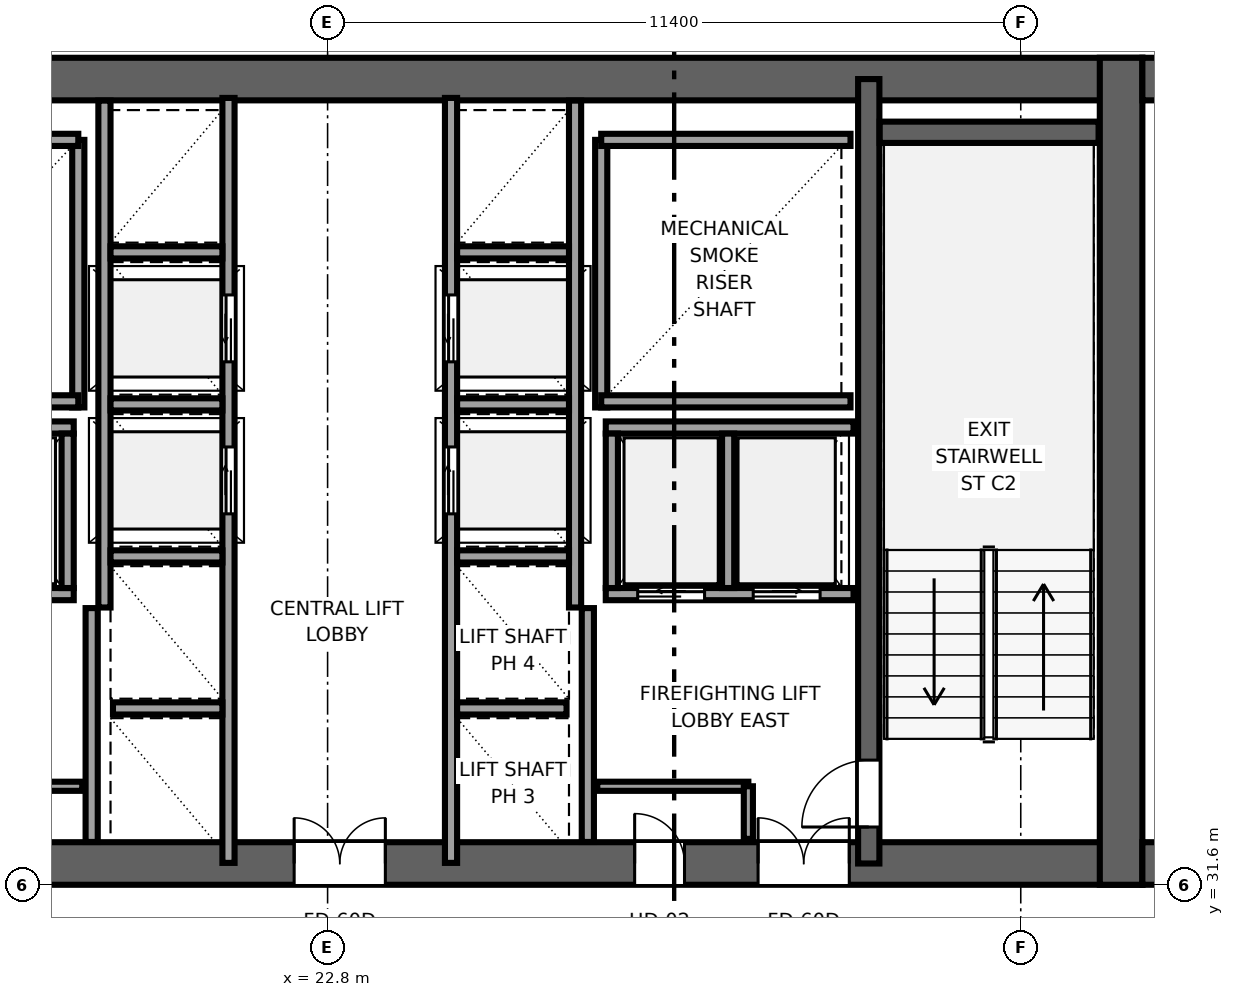
"""IFC4 building model, lengths in metres.
Left out: names, types, materials, properties, quantities, classifications, styles, units other than length and angle.
Written with IfcOpenShell. Run it as: python <this file> out.ifc"""

import sys

from ifc_helpers import new_model, si_unit, direction, frame, frame_2d, origin, place, context, subcontext, project, spatial, rectangle, extrude, source, transform, mapped, element, fill, save


model = new_model("IFC4")
c1 = context("Model", 3, precision=1e-05, world=origin(), true_north=direction((0.0, 1.0)))
c2 = subcontext(c1, "Body", "Model", "MODEL_VIEW")
j1 = project(units=[si_unit("LENGTHUNIT", "METRE"), si_unit("PLANEANGLEUNIT", "RADIAN")], contexts=[c1])
p1 = place(None, origin())
s1 = spatial("IfcSite", under=j1, at=p1, CompositionType="ELEMENT")
p2 = place(p1, origin())
s2 = spatial("IfcBuilding", under=s1, at=p2, CompositionType="ELEMENT")
p3 = place(p2, frame((0.0, 0.0, 191.1)))
s3 = spatial("IfcBuildingStorey", under=s2, at=p3, CompositionType="ELEMENT", Elevation=191.1)
p4 = place(p3, frame((9.8, 31.95, 0.0), z_axis=(0.0, 0.0, 1.0), x_axis=(1.0, 0.0, 0.0)))
e1 = element("IfcWall", 1, at=p4, inside=s3, PredefinedType="SHEAR", context=c2, shape_type="SweptSolid", body=[
    extrude(rectangle(XDim=26.4, YDim=0.7, at=frame_2d((13.2, 0.0))), origin(), (0.0, 0.0, 1.0), 3.55),
])
p5 = place(p4, frame((6.32, 0.0, 0.0), z_axis=(0.0, 0.0, 1.0), x_axis=(-1.0, 0.0, 0.0)))
e2 = element("IfcOpeningElement", 2, at=p5, cuts=e1, PredefinedType="OPENING", context=c2, shape_type="SweptSolid", body=[
    extrude(rectangle(XDim=1.5, YDim=2.04, at=frame_2d((0.75, 1.02))), frame((0.0, 0.36, 0.0), z_axis=(0.0, -1.0, 0.0), x_axis=(1.0, 0.0, 0.0)), (0.0, 0.0, 1.0), 0.72),
])
p6 = place(p4, frame((13.95, 0.0, 0.0), z_axis=(0.0, 0.0, 1.0), x_axis=(-1.0, 0.0, 0.0)))
e3 = element("IfcOpeningElement", 3, at=p6, cuts=e1, PredefinedType="OPENING", context=c2, shape_type="SweptSolid", body=[
    extrude(rectangle(XDim=1.5, YDim=2.04, at=frame_2d((0.75, 1.02))), frame((0.0, 0.36, 0.0), z_axis=(0.0, -1.0, 0.0), x_axis=(1.0, 0.0, 0.0)), (0.0, 0.0, 1.0), 0.72),
])
p7 = place(p4, frame((21.58, 0.0, 0.0), z_axis=(0.0, 0.0, 1.0), x_axis=(-1.0, 0.0, 0.0)))
e4 = element("IfcOpeningElement", 4, at=p7, cuts=e1, PredefinedType="OPENING", context=c2, shape_type="SweptSolid", body=[
    extrude(rectangle(XDim=1.5, YDim=2.04, at=frame_2d((0.75, 1.02))), frame((0.0, 0.36, 0.0), z_axis=(0.0, -1.0, 0.0), x_axis=(1.0, 0.0, 0.0)), (0.0, 0.0, 1.0), 0.72),
])
p8 = place(p4, frame((8.37, 0.0, 0.0), z_axis=(0.0, 0.0, 1.0), x_axis=(-1.0, 0.0, 0.0)))
e5 = element("IfcOpeningElement", 5, at=p8, cuts=e1, PredefinedType="OPENING", context=c2, shape_type="SweptSolid", body=[
    extrude(rectangle(XDim=0.82, YDim=2.01, at=frame_2d((0.41, 1.005))), frame((0.0, 0.36, 0.0), z_axis=(0.0, -1.0, 0.0), x_axis=(1.0, 0.0, 0.0)), (0.0, 0.0, 1.0), 0.72),
])
p9 = place(p4, frame((18.87, 0.0, 0.0), z_axis=(0.0, 0.0, 1.0), x_axis=(-1.0, 0.0, 0.0)))
e6 = element("IfcOpeningElement", 6, at=p9, cuts=e1, PredefinedType="OPENING", context=c2, shape_type="SweptSolid", body=[
    extrude(rectangle(XDim=0.82, YDim=2.01, at=frame_2d((0.41, 1.005))), frame((0.0, 0.36, 0.0), z_axis=(0.0, -1.0, 0.0), x_axis=(1.0, 0.0, 0.0)), (0.0, 0.0, 1.0), 0.72),
])
p10 = place(p3, frame((9.8, 44.85, 0.0), z_axis=(0.0, 0.0, 1.0), x_axis=(1.0, 0.0, 0.0)))
e7 = element("IfcWall", 7, at=p10, inside=s3, PredefinedType="SHEAR", context=c2, shape_type="SweptSolid", body=[
    extrude(rectangle(XDim=26.4, YDim=0.7, at=frame_2d((13.2, 0.0))), origin(), (0.0, 0.0, 1.0), 3.55),
])
p11 = place(p3, frame((35.85, 31.6, 0.0), z_axis=(0.0, 0.0, 1.0), x_axis=(0.0, 1.0, 0.0)))
e8 = element("IfcWall", 8, at=p11, inside=s3, PredefinedType="SHEAR", context=c2, shape_type="SweptSolid", body=[
    extrude(rectangle(XDim=13.6, YDim=0.7, at=frame_2d((6.8, 0.0))), origin(), (0.0, 0.0, 1.0), 3.55),
])
p12 = place(p3, frame((31.7, 31.95, 0.0), z_axis=(0.0, 0.0, 1.0), x_axis=(0.0, 1.0, 0.0)))
e9 = element("IfcWall", 9, at=p12, inside=s3, PredefinedType="SHEAR", context=c2, shape_type="SweptSolid", body=[
    extrude(rectangle(XDim=12.9, YDim=0.35, at=frame_2d((6.45, 0.0))), origin(), (0.0, 0.0, 1.0), 3.55),
])
p13 = place(p12, frame((1.7, 0.0, 0.0), z_axis=(0.0, 0.0, 1.0), x_axis=(-1.0, 0.0, 0.0)))
e10 = element("IfcOpeningElement", 10, at=p13, cuts=e9, PredefinedType="OPENING", context=c2, shape_type="SweptSolid", body=[
    extrude(rectangle(XDim=1.1, YDim=2.12, at=frame_2d((0.55, 1.06))), frame((0.0, 0.185, 0.0), z_axis=(0.0, -1.0, 0.0), x_axis=(1.0, 0.0, 0.0)), (0.0, 0.0, 1.0), 0.37),
])
p14 = place(p3, frame((36.2, 31.95, 0.0), z_axis=(0.0, 0.0, 1.0), x_axis=(1.0, 0.0, 0.0)))
e11 = element("IfcWall", 11, at=p14, inside=s3, PredefinedType="SHEAR", context=c2, shape_type="SweptSolid", body=[
    extrude(rectangle(XDim=4.2, YDim=0.7, at=frame_2d((2.1, 0.0))), origin(), (0.0, 0.0, 1.0), 3.55),
])
p15 = place(p14, frame((1.34, 0.0, 0.0), z_axis=(0.0, 0.0, 1.0), x_axis=(-1.0, 0.0, 0.0)))
e12 = element("IfcOpeningElement", 12, at=p15, cuts=e11, PredefinedType="OPENING", context=c2, shape_type="SweptSolid", body=[
    extrude(rectangle(XDim=1.02, YDim=2.03, at=frame_2d((0.51, 1.015))), frame((0.0, 0.36, 0.0), z_axis=(0.0, -1.0, 0.0), x_axis=(1.0, 0.0, 0.0)), (0.0, 0.0, 1.0), 0.72),
])
p16 = place(p3, frame((36.2, 44.85, 0.0), z_axis=(0.0, 0.0, 1.0), x_axis=(1.0, 0.0, 0.0)))
e13 = element("IfcWall", 13, at=p16, inside=s3, PredefinedType="SHEAR", context=c2, shape_type="SweptSolid", body=[
    extrude(rectangle(XDim=4.2, YDim=0.7, at=frame_2d((2.1, 0.0))), origin(), (0.0, 0.0, 1.0), 3.55),
])
p17 = place(p3, frame((31.88, 43.975, 0.0), z_axis=(0.0, 0.0, 1.0), x_axis=(1.0, 0.0, 0.0)))
e14 = element("IfcWall", 14, at=p17, inside=s3, PredefinedType="SHEAR", context=c2, shape_type="SweptSolid", body=[
    extrude(rectangle(XDim=3.6, YDim=0.35, at=frame_2d((1.8, 0.0))), origin(), (0.0, 0.0, 1.0), 3.55),
])
p18 = place(p3, frame((18.7, 39.45, 0.0), z_axis=(0.0, 0.0, 1.0), x_axis=(0.0, 1.0, 0.0)))
e15 = element("IfcWall", 15, at=p18, inside=s3, PredefinedType="SOLIDWALL", context=c2, shape_type="SweptSolid", body=[
    extrude(rectangle(XDim=4.4, YDim=0.2, at=frame_2d((2.2, 0.0))), origin(), (0.0, 0.0, 1.0), 3.37),
])
for number, where, z_axis, x_axis in (
    (16, (14.6, 39.55, 0.0), (0.0, 0.0, 1.0), (1.0, 0.0, 0.0)),
    (17, (14.6, 43.85, 0.0), (0.0, 0.0, 1.0), (1.0, 0.0, 0.0)),
):
    element("IfcWall", number, at=place(p3, frame(where, z_axis=z_axis, x_axis=x_axis)), inside=s3, PredefinedType="SOLIDWALL", context=c2, shape_type="SweptSolid", body=[
        extrude(rectangle(XDim=4.1, YDim=0.2, at=frame_2d((2.05, 0.0))), origin(), (0.0, 0.0, 1.0), 3.37),
    ])
p19 = place(p3, frame((27.3, 39.45, 0.0), z_axis=(0.0, 0.0, 1.0), x_axis=(0.0, 1.0, 0.0)))
e18 = element("IfcWall", 18, at=p19, inside=s3, PredefinedType="SOLIDWALL", context=c2, shape_type="SweptSolid", body=[
    extrude(rectangle(XDim=4.4, YDim=0.2, at=frame_2d((2.2, 0.0))), origin(), (0.0, 0.0, 1.0), 3.37),
])
for number, where, z_axis, x_axis in (
    (19, (27.3, 39.55, 0.0), (0.0, 0.0, 1.0), (1.0, 0.0, 0.0)),
    (20, (27.3, 43.85, 0.0), (0.0, 0.0, 1.0), (1.0, 0.0, 0.0)),
):
    element("IfcWall", number, at=place(p3, frame(where, z_axis=z_axis, x_axis=x_axis)), inside=s3, PredefinedType="SOLIDWALL", context=c2, shape_type="SweptSolid", body=[
        extrude(rectangle(XDim=4.1, YDim=0.2, at=frame_2d((2.05, 0.0))), origin(), (0.0, 0.0, 1.0), 3.37),
    ])
for number, where, z_axis, x_axis in (
    (21, (18.92, 32.304, 0.0), (0.0, 0.0, 1.0), (0.0, 1.0, 0.0)),
    (22, (27.08, 32.304, 0.0), (0.0, 0.0, 1.0), (0.0, 1.0, 0.0)),
):
    element("IfcWall", number, at=place(p3, frame(where, z_axis=z_axis, x_axis=x_axis)), inside=s3, PredefinedType="SOLIDWALL", context=c2, shape_type="SweptSolid", body=[
        extrude(rectangle(XDim=3.846, YDim=0.2, at=frame_2d((1.923, 0.0))), origin(), (0.0, 0.0, 1.0), 3.37),
    ])
p20 = place(p3, frame((21.17, 31.96, 0.0), z_axis=(0.0, 0.0, 1.0), x_axis=(0.0, 1.0, 0.0)))
e23 = element("IfcWall", 23, at=p20, inside=s3, PredefinedType="SOLIDWALL", context=c2, shape_type="SweptSolid", body=[
    extrude(rectangle(XDim=12.58, YDim=0.2, at=frame_2d((6.29, 0.0))), origin(), (0.0, 0.0, 1.0), 3.37),
])
p21 = place(p20, frame((5.74, 0.0, 0.0)))
e24 = element("IfcOpeningElement", 24, at=p21, cuts=e23, PredefinedType="OPENING", context=c2, shape_type="SweptSolid", body=[
    extrude(rectangle(XDim=1.1, YDim=2.12, at=frame_2d((0.55, 1.06))), frame((0.0, 0.11, 0.0), z_axis=(0.0, -1.0, 0.0), x_axis=(1.0, 0.0, 0.0)), (0.0, 0.0, 1.0), 0.22),
])
p22 = place(p20, frame((8.24, 0.0, 0.0)))
e25 = element("IfcOpeningElement", 25, at=p22, cuts=e23, PredefinedType="OPENING", context=c2, shape_type="SweptSolid", body=[
    extrude(rectangle(XDim=1.1, YDim=2.12, at=frame_2d((0.55, 1.06))), frame((0.0, 0.11, 0.0), z_axis=(0.0, -1.0, 0.0), x_axis=(1.0, 0.0, 0.0)), (0.0, 0.0, 1.0), 0.22),
])
p23 = place(p3, frame((19.13, 36.16, 0.0), z_axis=(0.0, 0.0, 1.0), x_axis=(0.0, 1.0, 0.0)))
e26 = element("IfcWall", 26, at=p23, inside=s3, PredefinedType="SOLIDWALL", context=c2, shape_type="SweptSolid", body=[
    extrude(rectangle(XDim=8.336, YDim=0.2, at=frame_2d((4.168, 0.0))), origin(), (0.0, 0.0, 1.0), 3.37),
])
p24 = place(p3, frame((19.27, 34.5, 0.0), z_axis=(0.0, 0.0, 1.0), x_axis=(1.0, 0.0, 0.0)))
e27 = element("IfcWall", 27, at=p24, inside=s3, PredefinedType="SOLIDWALL", context=c2, shape_type="SweptSolid", body=[
    extrude(rectangle(XDim=1.8, YDim=0.2, at=frame_2d((0.9, 0.0))), origin(), (0.0, 0.0, 1.0), 3.37),
])
for number, where, z_axis, x_axis in (
    (28, (19.23, 37.0, 0.0), (0.0, 0.0, 1.0), (1.0, 0.0, 0.0)),
    (29, (19.23, 39.5, 0.0), (0.0, 0.0, 1.0), (1.0, 0.0, 0.0)),
    (30, (19.23, 42.0, 0.0), (0.0, 0.0, 1.0), (1.0, 0.0, 0.0)),
):
    element("IfcWall", number, at=place(p3, frame(where, z_axis=z_axis, x_axis=x_axis)), inside=s3, PredefinedType="SOLIDWALL", context=c2, shape_type="SweptSolid", body=[
        extrude(rectangle(XDim=1.84, YDim=0.2, at=frame_2d((0.92, 0.0))), origin(), (0.0, 0.0, 1.0), 3.37),
    ])
p25 = place(p3, frame((27.375, 36.38, 0.0), z_axis=(0.0, 0.0, 1.0), x_axis=(1.0, 0.0, 0.0)))
e31 = element("IfcWall", 31, at=p25, inside=s3, PredefinedType="SOLIDWALL", context=c2, shape_type="SweptSolid", body=[
    extrude(rectangle(XDim=4.075, YDim=0.2, at=frame_2d((2.038, 0.0))), origin(), (0.0, 0.0, 1.0), 3.37),
])
p26 = place(p25, frame((0.525, 0.0, 0.0)))
e32 = element("IfcOpeningElement", 32, at=p26, cuts=e31, PredefinedType="OPENING", context=c2, shape_type="SweptSolid", body=[
    extrude(rectangle(XDim=1.1, YDim=2.12, at=frame_2d((0.55, 1.06))), frame((0.0, 0.11, 0.0), z_axis=(0.0, -1.0, 0.0), x_axis=(1.0, 0.0, 0.0)), (0.0, 0.0, 1.0), 0.22),
])
p27 = place(p25, frame((2.425, 0.0, 0.0)))
e33 = element("IfcOpeningElement", 33, at=p27, cuts=e31, PredefinedType="OPENING", context=c2, shape_type="SweptSolid", body=[
    extrude(rectangle(XDim=1.1, YDim=2.12, at=frame_2d((0.55, 1.06))), frame((0.0, 0.11, 0.0), z_axis=(0.0, -1.0, 0.0), x_axis=(1.0, 0.0, 0.0)), (0.0, 0.0, 1.0), 0.22),
])
p28 = place(p3, frame((27.375, 39.12, 0.0), z_axis=(0.0, 0.0, 1.0), x_axis=(1.0, 0.0, 0.0)))
e34 = element("IfcWall", 34, at=p28, inside=s3, PredefinedType="SOLIDWALL", context=c2, shape_type="SweptSolid", body=[
    extrude(rectangle(XDim=4.075, YDim=0.2, at=frame_2d((2.038, 0.0))), origin(), (0.0, 0.0, 1.0), 3.37),
])
for number, where, z_axis, x_axis in (
    (35, (27.475, 36.48, 0.0), (0.0, 0.0, 1.0), (0.0, 1.0, 0.0)),
    (36, (29.387, 36.48, 0.0), (0.0, 0.0, 1.0), (0.0, 1.0, 0.0)),
):
    element("IfcWall", number, at=place(p3, frame(where, z_axis=z_axis, x_axis=x_axis)), inside=s3, PredefinedType="SOLIDWALL", context=c2, shape_type="SweptSolid", body=[
        extrude(rectangle(XDim=2.54, YDim=0.2, at=frame_2d((1.27, 0.0))), origin(), (0.0, 0.0, 1.0), 3.37),
    ])
p29 = place(p3, frame((14.55, 36.38, 0.0), z_axis=(0.0, 0.0, 1.0), x_axis=(1.0, 0.0, 0.0)))
e37 = element("IfcWall", 37, at=p29, inside=s3, PredefinedType="SOLIDWALL", context=c2, shape_type="SweptSolid", body=[
    extrude(rectangle(XDim=4.075, YDim=0.2, at=frame_2d((2.038, 0.0))), origin(), (0.0, 0.0, 1.0), 3.37),
])
p30 = place(p29, frame((0.55, 0.0, 0.0)))
e38 = element("IfcOpeningElement", 38, at=p30, cuts=e37, PredefinedType="OPENING", context=c2, shape_type="SweptSolid", body=[
    extrude(rectangle(XDim=1.1, YDim=2.12, at=frame_2d((0.55, 1.06))), frame((0.0, 0.11, 0.0), z_axis=(0.0, -1.0, 0.0), x_axis=(1.0, 0.0, 0.0)), (0.0, 0.0, 1.0), 0.22),
])
p31 = place(p29, frame((2.45, 0.0, 0.0)))
e39 = element("IfcOpeningElement", 39, at=p31, cuts=e37, PredefinedType="OPENING", context=c2, shape_type="SweptSolid", body=[
    extrude(rectangle(XDim=1.1, YDim=2.12, at=frame_2d((0.55, 1.06))), frame((0.0, 0.11, 0.0), z_axis=(0.0, -1.0, 0.0), x_axis=(1.0, 0.0, 0.0)), (0.0, 0.0, 1.0), 0.22),
])
p32 = place(p3, frame((14.55, 39.12, 0.0), z_axis=(0.0, 0.0, 1.0), x_axis=(1.0, 0.0, 0.0)))
e40 = element("IfcWall", 40, at=p32, inside=s3, PredefinedType="SOLIDWALL", context=c2, shape_type="SweptSolid", body=[
    extrude(rectangle(XDim=4.075, YDim=0.2, at=frame_2d((2.038, 0.0))), origin(), (0.0, 0.0, 1.0), 3.37),
])
p33 = place(p3, frame((18.525, 36.48, 0.0), z_axis=(0.0, 0.0, 1.0), x_axis=(0.0, 1.0, 0.0)))
e41 = element("IfcWall", 41, at=p33, inside=s3, PredefinedType="SOLIDWALL", context=c2, shape_type="SweptSolid", body=[
    extrude(rectangle(XDim=2.54, YDim=0.2, at=frame_2d((1.27, 0.0))), origin(), (0.0, 0.0, 1.0), 3.37),
])
p34 = place(p3, frame((24.83, 31.96, 0.0), z_axis=(0.0, 0.0, 1.0), x_axis=(0.0, 1.0, 0.0)))
e42 = element("IfcWall", 42, at=p34, inside=s3, PredefinedType="SOLIDWALL", context=c2, shape_type="SweptSolid", body=[
    extrude(rectangle(XDim=12.58, YDim=0.2, at=frame_2d((6.29, 0.0))), origin(), (0.0, 0.0, 1.0), 3.37),
])
p35 = place(p34, frame((5.74, 0.0, 0.0)))
e43 = element("IfcOpeningElement", 43, at=p35, cuts=e42, PredefinedType="OPENING", context=c2, shape_type="SweptSolid", body=[
    extrude(rectangle(XDim=1.1, YDim=2.12, at=frame_2d((0.55, 1.06))), frame((0.0, 0.11, 0.0), z_axis=(0.0, -1.0, 0.0), x_axis=(1.0, 0.0, 0.0)), (0.0, 0.0, 1.0), 0.22),
])
p36 = place(p34, frame((8.24, 0.0, 0.0)))
e44 = element("IfcOpeningElement", 44, at=p36, cuts=e42, PredefinedType="OPENING", context=c2, shape_type="SweptSolid", body=[
    extrude(rectangle(XDim=1.1, YDim=2.12, at=frame_2d((0.55, 1.06))), frame((0.0, 0.11, 0.0), z_axis=(0.0, -1.0, 0.0), x_axis=(1.0, 0.0, 0.0)), (0.0, 0.0, 1.0), 0.22),
])
p37 = place(p3, frame((26.87, 36.16, 0.0), z_axis=(0.0, 0.0, 1.0), x_axis=(0.0, 1.0, 0.0)))
e45 = element("IfcWall", 45, at=p37, inside=s3, PredefinedType="SOLIDWALL", context=c2, shape_type="SweptSolid", body=[
    extrude(rectangle(XDim=8.336, YDim=0.2, at=frame_2d((4.168, 0.0))), origin(), (0.0, 0.0, 1.0), 3.37),
])
p38 = place(p3, frame((24.93, 34.5, 0.0), z_axis=(0.0, 0.0, 1.0), x_axis=(1.0, 0.0, 0.0)))
e46 = element("IfcWall", 46, at=p38, inside=s3, PredefinedType="SOLIDWALL", context=c2, shape_type="SweptSolid", body=[
    extrude(rectangle(XDim=1.8, YDim=0.2, at=frame_2d((0.9, 0.0))), origin(), (0.0, 0.0, 1.0), 3.37),
])
for number, where, z_axis, x_axis in (
    (47, (24.93, 37.0, 0.0), (0.0, 0.0, 1.0), (1.0, 0.0, 0.0)),
    (48, (24.93, 39.5, 0.0), (0.0, 0.0, 1.0), (1.0, 0.0, 0.0)),
    (49, (24.93, 42.0, 0.0), (0.0, 0.0, 1.0), (1.0, 0.0, 0.0)),
):
    element("IfcWall", number, at=place(p3, frame(where, z_axis=z_axis, x_axis=x_axis)), inside=s3, PredefinedType="SOLIDWALL", context=c2, shape_type="SweptSolid", body=[
        extrude(rectangle(XDim=1.84, YDim=0.2, at=frame_2d((0.92, 0.0))), origin(), (0.0, 0.0, 1.0), 3.37),
    ])
for number, where, z_axis, x_axis in (
    (50, (16.28, 33.22, 0.0), (0.0, 0.0, 1.0), (1.0, 0.0, 0.0)),
    (51, (27.235, 33.22, 0.0), (0.0, 0.0, 1.0), (1.0, 0.0, 0.0)),
):
    element("IfcWall", number, at=place(p3, frame(where, z_axis=z_axis, x_axis=x_axis)), inside=s3, PredefinedType="PARTITIONING", context=c2, shape_type="SweptSolid", body=[
        extrude(rectangle(XDim=2.485, YDim=0.15, at=frame_2d((1.242, 0.0))), origin(), (0.0, 0.0, 1.0), 3.37),
    ])
p39 = place(p3, frame((29.72, 32.355, 0.0), z_axis=(0.0, 0.0, 1.0), x_axis=(0.0, 1.0, 0.0)))
e52 = element("IfcWall", 52, at=p39, inside=s3, PredefinedType="PARTITIONING", context=c2, shape_type="SweptSolid", body=[
    extrude(rectangle(XDim=0.865, YDim=0.15, at=frame_2d((0.433, 0.0))), origin(), (0.0, 0.0, 1.0), 3.37),
])
m1 = source(origin(), c2, "Body", "SweptSolid", [
    extrude(rectangle(XDim=1.1, YDim=2.12, at=frame_2d((0.55, 1.06))), frame((0.0, 0.025, 0.0), z_axis=(0.0, -1.0, 0.0), x_axis=(1.0, 0.0, 0.0)), (0.0, 0.0, 1.0), 0.05),
])
p40 = place(p13, origin())
e53 = element("IfcDoor", 53, at=p40, inside=s3, OperationType="SINGLE_SWING_LEFT", PredefinedType="DOOR", context=c2, shape_type="MappedRepresentation", body=[
    mapped(m1, transform((0.0, 0.0, 0.0), x_axis=(1.0, 0.0, 0.0), y_axis=(0.0, 1.0, 0.0), z_axis=(0.0, 0.0, 1.0), scale=1.0)),
])
fill(e10, e53)
m2 = source(origin(), c2, "Body", "SweptSolid", [
    extrude(rectangle(XDim=1.5, YDim=2.04, at=frame_2d((0.75, 1.02))), frame((0.0, 0.025, 0.0), z_axis=(0.0, -1.0, 0.0), x_axis=(1.0, 0.0, 0.0)), (0.0, 0.0, 1.0), 0.05),
])
p41 = place(p6, origin())
e54 = element("IfcDoor", 54, at=p41, inside=s3, OperationType="DOUBLE_DOOR_SINGLE_SWING", PredefinedType="DOOR", context=c2, shape_type="MappedRepresentation", body=[
    mapped(m2, transform((0.0, 0.0, 0.0), x_axis=(1.0, 0.0, 0.0), y_axis=(0.0, 1.0, 0.0), z_axis=(0.0, 0.0, 1.0), scale=1.0)),
])
fill(e3, e54)
p42 = place(p7, origin())
e55 = element("IfcDoor", 55, at=p42, inside=s3, OperationType="DOUBLE_DOOR_SINGLE_SWING", PredefinedType="DOOR", context=c2, shape_type="MappedRepresentation", body=[
    mapped(m2, transform((0.0, 0.0, 0.0), x_axis=(1.0, 0.0, 0.0), y_axis=(0.0, 1.0, 0.0), z_axis=(0.0, 0.0, 1.0), scale=1.0)),
])
fill(e4, e55)
m3 = source(origin(), c2, "Body", "SweptSolid", [
    extrude(rectangle(XDim=0.82, YDim=2.01, at=frame_2d((0.41, 1.005))), frame((0.0, 0.025, 0.0), z_axis=(0.0, -1.0, 0.0), x_axis=(1.0, 0.0, 0.0)), (0.0, 0.0, 1.0), 0.05),
])
p43 = place(p9, origin())
e56 = element("IfcDoor", 56, at=p43, inside=s3, OperationType="SINGLE_SWING_LEFT", PredefinedType="DOOR", context=c2, shape_type="MappedRepresentation", body=[
    mapped(m3, transform((0.0, 0.0, 0.0), x_axis=(1.0, 0.0, 0.0), y_axis=(0.0, 1.0, 0.0), z_axis=(0.0, 0.0, 1.0), scale=1.0)),
])
fill(e6, e56)
m4 = source(origin(), c2, "Body", "SweptSolid", [
    extrude(rectangle(XDim=1.1, YDim=2.12, at=frame_2d((0.55, 1.06))), frame((0.0, 0.025, 0.0), z_axis=(0.0, -1.0, 0.0), x_axis=(1.0, 0.0, 0.0)), (0.0, 0.0, 1.0), 0.05),
])
p44 = place(p21, origin())
e57 = element("IfcDoor", 57, at=p44, inside=s3, OperationType="SLIDING_TO_RIGHT", PredefinedType="DOOR", context=c2, shape_type="MappedRepresentation", body=[
    mapped(m4, transform((0.0, 0.0, 0.0), x_axis=(1.0, 0.0, 0.0), y_axis=(0.0, 1.0, 0.0), z_axis=(0.0, 0.0, 1.0), scale=1.0)),
])
fill(e24, e57)
p45 = place(p22, origin())
e58 = element("IfcDoor", 58, at=p45, inside=s3, OperationType="SLIDING_TO_LEFT", PredefinedType="DOOR", context=c2, shape_type="MappedRepresentation", body=[
    mapped(m4, transform((0.0, 0.0, 0.0), x_axis=(1.0, 0.0, 0.0), y_axis=(0.0, 1.0, 0.0), z_axis=(0.0, 0.0, 1.0), scale=1.0)),
])
fill(e25, e58)
p46 = place(p26, origin())
e59 = element("IfcDoor", 59, at=p46, inside=s3, OperationType="SLIDING_TO_LEFT", PredefinedType="DOOR", context=c2, shape_type="MappedRepresentation", body=[
    mapped(m4, transform((0.0, 0.0, 0.0), x_axis=(1.0, 0.0, 0.0), y_axis=(0.0, 1.0, 0.0), z_axis=(0.0, 0.0, 1.0), scale=1.0)),
])
fill(e32, e59)
p47 = place(p27, origin())
e60 = element("IfcDoor", 60, at=p47, inside=s3, OperationType="SLIDING_TO_RIGHT", PredefinedType="DOOR", context=c2, shape_type="MappedRepresentation", body=[
    mapped(m4, transform((0.0, 0.0, 0.0), x_axis=(1.0, 0.0, 0.0), y_axis=(0.0, 1.0, 0.0), z_axis=(0.0, 0.0, 1.0), scale=1.0)),
])
fill(e33, e60)
p48 = place(p35, origin())
e61 = element("IfcDoor", 61, at=p48, inside=s3, OperationType="SLIDING_TO_RIGHT", PredefinedType="DOOR", context=c2, shape_type="MappedRepresentation", body=[
    mapped(m4, transform((0.0, 0.0, 0.0), x_axis=(1.0, 0.0, 0.0), y_axis=(0.0, 1.0, 0.0), z_axis=(0.0, 0.0, 1.0), scale=1.0)),
])
fill(e43, e61)
p49 = place(p36, origin())
e62 = element("IfcDoor", 62, at=p49, inside=s3, OperationType="SLIDING_TO_LEFT", PredefinedType="DOOR", context=c2, shape_type="MappedRepresentation", body=[
    mapped(m4, transform((0.0, 0.0, 0.0), x_axis=(1.0, 0.0, 0.0), y_axis=(0.0, 1.0, 0.0), z_axis=(0.0, 0.0, 1.0), scale=1.0)),
])
fill(e44, e62)
save(model, sys.argv[1])
